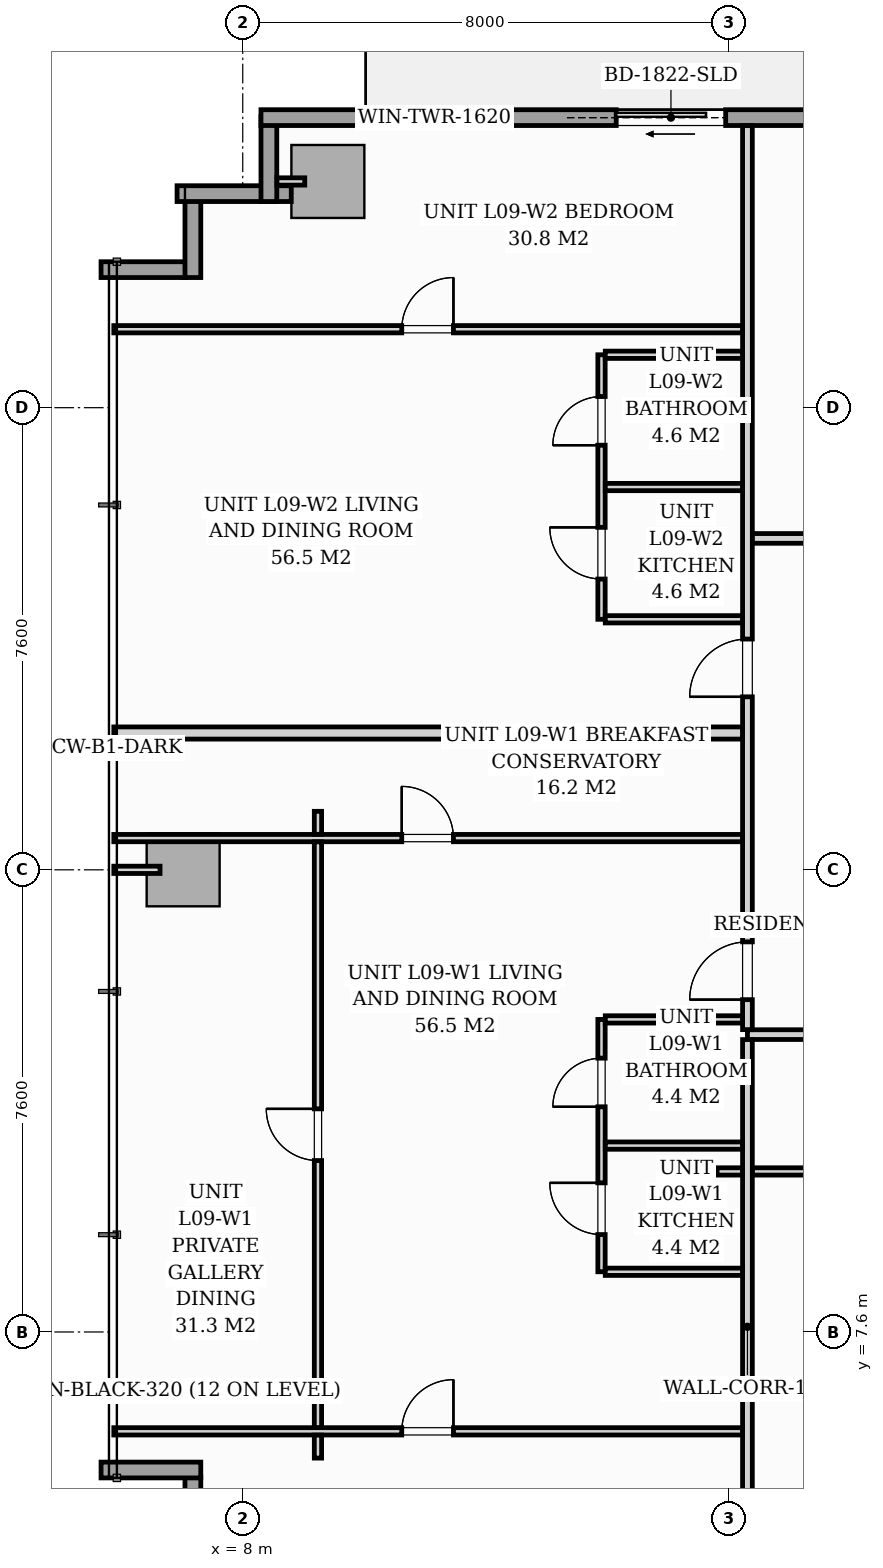
"""IFC4 building model, lengths in metres.
Left out: names, types, materials, properties, quantities, classifications, styles, units other than length and angle.
Written with IfcOpenShell. Run it as: python <this file> out.ifc"""

import sys

from ifc_helpers import new_model, si_unit, direction, frame, frame_2d, origin, origin_2d, place, context, subcontext, project, spatial, rectangle, extrude, source, transform, mapped, element, fill, save


model = new_model("IFC4")
c1 = context("Model", 3, precision=1e-05, world=origin(), true_north=direction((0.0, 1.0)))
c2 = subcontext(c1, "Body", "Model", "MODEL_VIEW")
j1 = project(units=[si_unit("LENGTHUNIT", "METRE"), si_unit("PLANEANGLEUNIT", "RADIAN")], contexts=[c1])
p1 = place(None, origin())
s1 = spatial("IfcSite", under=j1, at=p1, CompositionType="ELEMENT")
p2 = place(p1, origin())
s2 = spatial("IfcBuilding", under=s1, at=p2, CompositionType="ELEMENT")
p3 = place(p2, frame((0.0, 0.0, 35.8)))
s3 = spatial("IfcBuildingStorey", under=s2, at=p3, CompositionType="ELEMENT", Elevation=35.8)
m1 = source(origin(), c2, "Body", "SweptSolid", [
    extrude(rectangle(XDim=1.2, YDim=1.2, at=origin_2d()), origin(), (0.0, 0.0, 1.0), 3.196),
])
for number, where, z_axis, x_axis in (
    (1, (9.4, 26.52, 0.002), (0.0, 0.0, 1.0), (1.0, 0.0, 0.0)),
    (2, (7.02, 15.2, 0.002), (0.0, 0.0, 1.0), (1.0, 0.0, 0.0)),
):
    element("IfcColumn", number, at=place(p3, frame(where, z_axis=z_axis, x_axis=x_axis)), inside=s3, PredefinedType="COLUMN", context=c2, shape_type="MappedRepresentation", body=[
        mapped(m1, transform((0.0, 0.0, 0.0), scale=1.0)),
    ])
p4 = place(p3, frame((7.18, 4.065, 0.0), z_axis=(0.0, 0.0, 1.0), x_axis=(0.0, 1.0, 0.0)))
e3 = element("IfcWall", 3, at=p4, inside=s3, PredefinedType="STANDARD", context=c2, shape_type="SweptSolid", body=[
    extrude(rectangle(XDim=1.15, YDim=0.26, at=frame_2d((0.575, 0.0))), origin(), (0.0, 0.0, 1.0), 2.94),
])
p5 = place(p3, frame((7.31, 5.33, 0.0), z_axis=(0.0, 0.0, 1.0), x_axis=(-1.0, 0.0, 0.0)))
e4 = element("IfcWall", 4, at=p5, inside=s3, PredefinedType="STANDARD", context=c2, shape_type="SweptSolid", body=[
    extrude(rectangle(XDim=1.64, YDim=0.26, at=frame_2d((0.82, 0.0))), origin(), (0.0, 0.0, 1.0), 2.94),
])
for number, where, z_axis, x_axis in (
    (5, (5.67, 25.07, 0.0), (0.0, 0.0, 1.0), (1.0, 0.0, 0.0)),
    (6, (7.18, 24.94, 0.0), (0.0, 0.0, 1.0), (0.0, 1.0, 0.0)),
):
    element("IfcWall", number, at=place(p3, frame(where, z_axis=z_axis, x_axis=x_axis)), inside=s3, PredefinedType="STANDARD", context=c2, shape_type="SweptSolid", body=[
        extrude(rectangle(XDim=1.395, YDim=0.26, at=frame_2d((0.698, 0.0))), origin(), (0.0, 0.0, 1.0), 2.94),
    ])
p6 = place(p3, frame((6.92, 26.32, 0.0), z_axis=(0.0, 0.0, 1.0), x_axis=(1.0, 0.0, 0.0)))
e7 = element("IfcWall", 7, at=p6, inside=s3, PredefinedType="STANDARD", context=c2, shape_type="SweptSolid", body=[
    extrude(rectangle(XDim=1.878, YDim=0.26, at=frame_2d((0.939, 0.0))), origin(), (0.0, 0.0, 1.0), 2.94),
])
p7 = place(p3, frame((8.43, 26.19, 0.0), z_axis=(0.0, 0.0, 1.0), x_axis=(0.0, 1.0, 0.0)))
e8 = element("IfcWall", 8, at=p7, inside=s3, PredefinedType="STANDARD", context=c2, shape_type="SweptSolid", body=[
    extrude(rectangle(XDim=1.395, YDim=0.26, at=frame_2d((0.698, 0.0))), origin(), (0.0, 0.0, 1.0), 2.94),
])
p8 = place(p3, frame((8.3, 27.57, 0.0), z_axis=(0.0, 0.0, 1.0), x_axis=(1.0, 0.0, 0.0)))
e9 = element("IfcWall", 9, at=p8, inside=s3, PredefinedType="STANDARD", context=c2, shape_type="SweptSolid", body=[
    extrude(rectangle(XDim=17.15, YDim=0.26, at=frame_2d((8.575, 0.0))), origin(), (0.0, 0.0, 1.0), 2.94),
])
p9 = place(p8, frame((5.842, 0.0, 0.0)))
e10 = element("IfcOpeningElement", 10, at=p9, cuts=e9, PredefinedType="OPENING", context=c2, shape_type="SweptSolid", body=[
    extrude(rectangle(XDim=1.8, YDim=2.06, at=frame_2d((0.9, 1.03))), frame((0.0, 0.14, 0.0), z_axis=(0.0, -1.0, 0.0), x_axis=(1.0, 0.0, 0.0)), (0.0, 0.0, 1.0), 0.28),
])
p10 = place(p8, frame((2.05, 0.0, 0.65)))
e11 = element("IfcOpeningElement", 11, at=p10, cuts=e9, PredefinedType="OPENING", context=c2, shape_type="SweptSolid", body=[
    extrude(rectangle(XDim=1.6, YDim=1.5, at=frame_2d((0.8, 0.75))), frame((0.0, 0.14, 0.0), z_axis=(0.0, -1.0, 0.0), x_axis=(1.0, 0.0, 0.0)), (0.0, 0.0, 1.0), 0.28),
])
p11 = place(p3, frame((16.3, 12.49, 0.0), z_axis=(0.0, 0.0, 1.0), x_axis=(1.0, 0.0, 0.0)))
e12 = element("IfcWall", 12, at=p11, inside=s3, PredefinedType="PARTITIONING", context=c2, shape_type="SweptSolid", body=[
    extrude(rectangle(XDim=35.2, YDim=0.16, at=frame_2d((17.6, 0.0))), origin(), (0.0, 0.0, 1.0), 2.94),
])
p12 = place(p11, frame((11.072, 0.0, 0.0)))
e13 = element("IfcOpeningElement", 13, at=p12, cuts=e12, PredefinedType="OPENING", context=c2, shape_type="SweptSolid", body=[
    extrude(rectangle(XDim=0.95, YDim=2.06, at=frame_2d((0.475, 1.03))), frame((0.0, 0.09, 0.0), z_axis=(0.0, -1.0, 0.0), x_axis=(1.0, 0.0, 0.0)), (0.0, 0.0, 1.0), 0.18),
])
p13 = place(p11, frame((24.032, 0.0, 0.0)))
e14 = element("IfcOpeningElement", 14, at=p13, cuts=e12, PredefinedType="OPENING", context=c2, shape_type="SweptSolid", body=[
    extrude(rectangle(XDim=0.95, YDim=2.06, at=frame_2d((0.475, 1.03))), frame((0.0, 0.09, 0.0), z_axis=(0.0, -1.0, 0.0), x_axis=(1.0, 0.0, 0.0)), (0.0, 0.0, 1.0), 0.18),
])
p14 = place(p3, frame((16.3, 2.962, 0.0), z_axis=(0.0, 0.0, 1.0), x_axis=(0.0, 1.0, 0.0)))
e15 = element("IfcWall", 15, at=p14, inside=s3, PredefinedType="PARTITIONING", context=c2, shape_type="SweptSolid", body=[
    extrude(rectangle(XDim=9.446, YDim=0.16, at=frame_2d((4.723, 0.0))), origin(), (0.0, 0.0, 1.0), 2.94),
])
p15 = place(p3, frame((16.3, 12.572, 0.0), z_axis=(0.0, 0.0, 1.0), x_axis=(0.0, 1.0, 0.0)))
e16 = element("IfcWall", 16, at=p15, inside=s3, PredefinedType="PARTITIONING", context=c2, shape_type="SweptSolid", body=[
    extrude(rectangle(XDim=14.866, YDim=0.16, at=frame_2d((7.433, 0.0))), origin(), (0.0, 0.0, 1.0), 2.94),
])
p16 = place(p15, frame((0.493, 0.0, 0.0)))
e17 = element("IfcOpeningElement", 17, at=p16, cuts=e16, PredefinedType="OPENING", context=c2, shape_type="SweptSolid", body=[
    extrude(rectangle(XDim=0.95, YDim=2.06, at=frame_2d((0.475, 1.03))), frame((0.0, 0.09, 0.0), z_axis=(0.0, -1.0, 0.0), x_axis=(1.0, 0.0, 0.0)), (0.0, 0.0, 1.0), 0.18),
])
p17 = place(p15, frame((5.473, 0.0, 0.0)))
e18 = element("IfcOpeningElement", 18, at=p17, cuts=e16, PredefinedType="OPENING", context=c2, shape_type="SweptSolid", body=[
    extrude(rectangle(XDim=0.95, YDim=2.06, at=frame_2d((0.475, 1.03))), frame((0.0, 0.09, 0.0), z_axis=(0.0, -1.0, 0.0), x_axis=(1.0, 0.0, 0.0)), (0.0, 0.0, 1.0), 0.18),
])
p18 = place(p3, frame((15.8, 10.24, 0.0), z_axis=(0.0, 0.0, 1.0), x_axis=(1.0, 0.0, 0.0)))
e19 = element("IfcWall", 19, at=p18, inside=s3, PredefinedType="PARTITIONING", context=c2, shape_type="SweptSolid", body=[
    extrude(rectangle(XDim=0.418, YDim=0.12, at=frame_2d((0.209, 0.0))), origin(), (0.0, 0.0, 1.0), 2.94),
])
p19 = place(p3, frame((16.382, 10.24, 0.0), z_axis=(0.0, 0.0, 1.0), x_axis=(1.0, 0.0, 0.0)))
e20 = element("IfcWall", 20, at=p19, inside=s3, PredefinedType="PARTITIONING", context=c2, shape_type="SweptSolid", body=[
    extrude(rectangle(XDim=3.386, YDim=0.12, at=frame_2d((1.693, 0.0))), origin(), (0.0, 0.0, 1.0), 2.94),
])
p20 = place(p3, frame((5.88, 17.45, 0.0), z_axis=(0.0, 0.0, 1.0), x_axis=(1.0, 0.0, 0.0)))
e21 = element("IfcWall", 21, at=p20, inside=s3, PredefinedType="PARTITIONING", context=c2, shape_type="SweptSolid", body=[
    extrude(rectangle(XDim=10.338, YDim=0.2, at=frame_2d((5.169, 0.0))), origin(), (0.0, 0.0, 1.0), 2.94),
])
p21 = place(p3, frame((13.9, 8.59, 0.0), z_axis=(0.0, 0.0, 1.0), x_axis=(0.0, 1.0, 0.0)))
e22 = element("IfcWall", 22, at=p21, inside=s3, PredefinedType="PARTITIONING", context=c2, shape_type="SweptSolid", body=[
    extrude(rectangle(XDim=4.15, YDim=0.12, at=frame_2d((2.075, 0.0))), origin(), (0.0, 0.0, 1.0), 2.94),
])
p22 = place(p21, frame((0.612, 0.0, 0.0)))
e23 = element("IfcOpeningElement", 23, at=p22, cuts=e22, PredefinedType="OPENING", context=c2, shape_type="SweptSolid", body=[
    extrude(rectangle(XDim=0.85, YDim=2.05, at=frame_2d((0.425, 1.025))), frame((0.0, 0.07, 0.0), z_axis=(0.0, -1.0, 0.0), x_axis=(1.0, 0.0, 0.0)), (0.0, 0.0, 1.0), 0.14),
])
p23 = place(p21, frame((2.713, 0.0, 0.0)))
e24 = element("IfcOpeningElement", 24, at=p23, cuts=e22, PredefinedType="OPENING", context=c2, shape_type="SweptSolid", body=[
    extrude(rectangle(XDim=0.8, YDim=2.02, at=frame_2d((0.4, 1.01))), frame((0.0, 0.07, 0.0), z_axis=(0.0, -1.0, 0.0), x_axis=(1.0, 0.0, 0.0)), (0.0, 0.0, 1.0), 0.14),
])
for number, where, z_axis, x_axis in (
    (25, (13.962, 10.665, 0.0), (0.0, 0.0, 1.0), (1.0, 0.0, 0.0)),
    (26, (13.962, 8.59, 0.0), (0.0, 0.0, 1.0), (1.0, 0.0, 0.0)),
    (27, (13.962, 12.74, 0.0), (0.0, 0.0, 1.0), (1.0, 0.0, 0.0)),
):
    element("IfcWall", number, at=place(p3, frame(where, z_axis=z_axis, x_axis=x_axis)), inside=s3, PredefinedType="PARTITIONING", context=c2, shape_type="SweptSolid", body=[
        extrude(rectangle(XDim=2.256, YDim=0.12, at=frame_2d((1.128, 0.0))), origin(), (0.0, 0.0, 1.0), 2.94),
    ])
p24 = place(p3, frame((5.88, 5.966, 0.0), z_axis=(0.0, 0.0, 1.0), x_axis=(1.0, 0.0, 0.0)))
e28 = element("IfcWall", 28, at=p24, inside=s3, PredefinedType="PARTITIONING", context=c2, shape_type="SweptSolid", body=[
    extrude(rectangle(XDim=10.338, YDim=0.12, at=frame_2d((5.169, 0.0))), origin(), (0.0, 0.0, 1.0), 2.94),
])
p25 = place(p24, frame((4.735, 0.0, 0.0)))
e29 = element("IfcOpeningElement", 29, at=p25, cuts=e28, PredefinedType="OPENING", context=c2, shape_type="SweptSolid", body=[
    extrude(rectangle(XDim=0.85, YDim=2.05, at=frame_2d((0.425, 1.025))), frame((0.0, 0.07, 0.0), z_axis=(0.0, -1.0, 0.0), x_axis=(1.0, 0.0, 0.0)), (0.0, 0.0, 1.0), 0.14),
])
p26 = place(p3, frame((5.88, 15.722, 0.0), z_axis=(0.0, 0.0, 1.0), x_axis=(1.0, 0.0, 0.0)))
e30 = element("IfcWall", 30, at=p26, inside=s3, PredefinedType="PARTITIONING", context=c2, shape_type="SweptSolid", body=[
    extrude(rectangle(XDim=10.338, YDim=0.12, at=frame_2d((5.169, 0.0))), origin(), (0.0, 0.0, 1.0), 2.045),
])
p27 = place(p26, frame((4.735, 0.0, 0.0)))
e31 = element("IfcOpeningElement", 31, at=p27, cuts=e30, PredefinedType="OPENING", context=c2, shape_type="SweptSolid", body=[
    extrude(rectangle(XDim=0.85, YDim=2.01, at=frame_2d((0.425, 1.005))), frame((0.0, 0.07, 0.0), z_axis=(0.0, -1.0, 0.0), x_axis=(1.0, 0.0, 0.0)), (0.0, 0.0, 1.0), 0.14),
])
p28 = place(p3, frame((9.237, 5.526, 0.0), z_axis=(0.0, 0.0, 1.0), x_axis=(0.0, 1.0, 0.0)))
e32 = element("IfcWall", 32, at=p28, inside=s3, PredefinedType="PARTITIONING", context=c2, shape_type="SweptSolid", body=[
    extrude(rectangle(XDim=0.378, YDim=0.12, at=frame_2d((0.189, 0.0))), origin(), (0.0, 0.0, 1.0), 2.94),
])
p29 = place(p3, frame((9.237, 6.028, 0.0), z_axis=(0.0, 0.0, 1.0), x_axis=(0.0, 1.0, 0.0)))
e33 = element("IfcWall", 33, at=p29, inside=s3, PredefinedType="PARTITIONING", context=c2, shape_type="SweptSolid", body=[
    extrude(rectangle(XDim=9.632, YDim=0.12, at=frame_2d((4.816, 0.0))), origin(), (0.0, 0.0, 1.0), 2.94),
])
p30 = place(p29, frame((4.391, 0.0, 0.0)))
e34 = element("IfcOpeningElement", 34, at=p30, cuts=e33, PredefinedType="OPENING", context=c2, shape_type="SweptSolid", body=[
    extrude(rectangle(XDim=0.85, YDim=2.05, at=frame_2d((0.425, 1.025))), frame((0.0, 0.07, 0.0), z_axis=(0.0, -1.0, 0.0), x_axis=(1.0, 0.0, 0.0)), (0.0, 0.0, 1.0), 0.14),
])
p31 = place(p3, frame((9.237, 15.784, 0.0), z_axis=(0.0, 0.0, 1.0), x_axis=(0.0, 1.0, 0.0)))
e35 = element("IfcWall", 35, at=p31, inside=s3, PredefinedType="PARTITIONING", context=c2, shape_type="SweptSolid", body=[
    extrude(rectangle(XDim=0.378, YDim=0.12, at=frame_2d((0.189, 0.0))), origin(), (0.0, 0.0, 1.0), 2.94),
])
p32 = place(p3, frame((13.9, 19.32, 0.0), z_axis=(0.0, 0.0, 1.0), x_axis=(0.0, 1.0, 0.0)))
e36 = element("IfcWall", 36, at=p32, inside=s3, PredefinedType="PARTITIONING", context=c2, shape_type="SweptSolid", body=[
    extrude(rectangle(XDim=4.35, YDim=0.12, at=frame_2d((2.175, 0.0))), origin(), (0.0, 0.0, 1.0), 2.94),
])
p33 = place(p32, frame((0.662, 0.0, 0.0)))
e37 = element("IfcOpeningElement", 37, at=p33, cuts=e36, PredefinedType="OPENING", context=c2, shape_type="SweptSolid", body=[
    extrude(rectangle(XDim=0.85, YDim=2.05, at=frame_2d((0.425, 1.025))), frame((0.0, 0.07, 0.0), z_axis=(0.0, -1.0, 0.0), x_axis=(1.0, 0.0, 0.0)), (0.0, 0.0, 1.0), 0.14),
])
p34 = place(p32, frame((2.863, 0.0, 0.0)))
e38 = element("IfcOpeningElement", 38, at=p34, cuts=e36, PredefinedType="OPENING", context=c2, shape_type="SweptSolid", body=[
    extrude(rectangle(XDim=0.8, YDim=2.02, at=frame_2d((0.4, 1.01))), frame((0.0, 0.07, 0.0), z_axis=(0.0, -1.0, 0.0), x_axis=(1.0, 0.0, 0.0)), (0.0, 0.0, 1.0), 0.14),
])
for number, where, z_axis, x_axis in (
    (39, (13.962, 21.495, 0.0), (0.0, 0.0, 1.0), (1.0, 0.0, 0.0)),
    (40, (13.962, 19.32, 0.0), (0.0, 0.0, 1.0), (1.0, 0.0, 0.0)),
    (41, (13.962, 23.67, 0.0), (0.0, 0.0, 1.0), (1.0, 0.0, 0.0)),
):
    element("IfcWall", number, at=place(p3, frame(where, z_axis=z_axis, x_axis=x_axis)), inside=s3, PredefinedType="PARTITIONING", context=c2, shape_type="SweptSolid", body=[
        extrude(rectangle(XDim=2.256, YDim=0.12, at=frame_2d((1.128, 0.0))), origin(), (0.0, 0.0, 1.0), 2.94),
    ])
p35 = place(p3, frame((5.88, 24.09, 0.0), z_axis=(0.0, 0.0, 1.0), x_axis=(1.0, 0.0, 0.0)))
e42 = element("IfcWall", 42, at=p35, inside=s3, PredefinedType="PARTITIONING", context=c2, shape_type="SweptSolid", body=[
    extrude(rectangle(XDim=10.338, YDim=0.12, at=frame_2d((5.169, 0.0))), origin(), (0.0, 0.0, 1.0), 2.94),
])
p36 = place(p35, frame((4.735, 0.0, 0.0)))
e43 = element("IfcOpeningElement", 43, at=p36, cuts=e42, PredefinedType="OPENING", context=c2, shape_type="SweptSolid", body=[
    extrude(rectangle(XDim=0.85, YDim=2.05, at=frame_2d((0.425, 1.025))), frame((0.0, 0.07, 0.0), z_axis=(0.0, -1.0, 0.0), x_axis=(1.0, 0.0, 0.0)), (0.0, 0.0, 1.0), 0.14),
])
p37 = place(p3, frame((16.382, 20.65, 0.0), z_axis=(0.0, 0.0, 1.0), x_axis=(1.0, 0.0, 0.0)))
e44 = element("IfcWall", 44, at=p37, inside=s3, PredefinedType="PARTITIONING", context=c2, shape_type="SweptSolid", body=[
    extrude(rectangle(XDim=1.786, YDim=0.16, at=frame_2d((0.893, 0.0))), origin(), (0.0, 0.0, 1.0), 2.94),
])
p38 = place(p3, frame((9.02, 26.52, 0.0), z_axis=(0.0, 0.0, 1.0), x_axis=(-1.0, 0.0, 0.0)))
e45 = element("IfcWall", 45, at=p38, inside=s3, PredefinedType="PARTITIONING", context=c2, shape_type="SweptSolid", body=[
    extrude(rectangle(XDim=0.458, YDim=0.12, at=frame_2d((0.229, 0.0))), origin(), (0.0, 0.0, 1.0), 2.94),
])
p39 = place(p3, frame((6.64, 15.2, 0.0), z_axis=(0.0, 0.0, 1.0), x_axis=(-1.0, 0.0, 0.0)))
e46 = element("IfcWall", 46, at=p39, inside=s3, PredefinedType="PARTITIONING", context=c2, shape_type="SweptSolid", body=[
    extrude(rectangle(XDim=0.76, YDim=0.12, at=frame_2d((0.38, 0.0))), origin(), (0.0, 0.0, 1.0), 2.94),
])
m2 = source(origin(), c2, "Body", "SweptSolid", [
    extrude(rectangle(XDim=1.8, YDim=2.06, at=frame_2d((0.9, 1.03))), frame((0.0, 0.025, 0.0), z_axis=(0.0, -1.0, 0.0), x_axis=(1.0, 0.0, 0.0)), (0.0, 0.0, 1.0), 0.05),
])
p40 = place(p9, origin())
e47 = element("IfcDoor", 47, at=p40, inside=s3, OperationType="SLIDING_TO_LEFT", PredefinedType="DOOR", context=c2, shape_type="MappedRepresentation", body=[
    mapped(m2, transform((0.0, 0.0, 0.0), scale=1.0)),
])
fill(e10, e47)
m3 = source(origin(), c2, "Body", "SweptSolid", [
    extrude(rectangle(XDim=1.6, YDim=1.5, at=frame_2d((0.8, 0.75))), frame((0.0, 0.03, 0.0), z_axis=(0.0, -1.0, 0.0), x_axis=(1.0, 0.0, 0.0)), (0.0, 0.0, 1.0), 0.06),
])
p41 = place(p10, origin())
e48 = element("IfcWindow", 48, at=p41, inside=s3, PartitioningType="SINGLE_PANEL", PredefinedType="WINDOW", context=c2, shape_type="MappedRepresentation", body=[
    mapped(m3, transform((0.0, 0.0, 0.0), scale=1.0)),
])
fill(e11, e48)
m4 = source(origin(), c2, "Body", "SweptSolid", [
    extrude(rectangle(XDim=0.95, YDim=2.06, at=frame_2d((0.475, 1.03))), frame((0.0, 0.025, 0.0), z_axis=(0.0, -1.0, 0.0), x_axis=(1.0, 0.0, 0.0)), (0.0, 0.0, 1.0), 0.05),
])
p42 = place(p16, origin())
e49 = element("IfcDoor", 49, at=p42, inside=s3, OperationType="SINGLE_SWING_LEFT", PredefinedType="DOOR", context=c2, shape_type="MappedRepresentation", body=[
    mapped(m4, transform((0.0, 0.0, 0.0), scale=1.0)),
])
fill(e17, e49)
m5 = source(origin(), c2, "Body", "SweptSolid", [
    extrude(rectangle(XDim=0.85, YDim=2.05, at=frame_2d((0.425, 1.025))), frame((0.0, 0.025, 0.0), z_axis=(0.0, -1.0, 0.0), x_axis=(1.0, 0.0, 0.0)), (0.0, 0.0, 1.0), 0.05),
])
p43 = place(p22, origin())
e50 = element("IfcDoor", 50, at=p43, inside=s3, OperationType="SINGLE_SWING_RIGHT", PredefinedType="DOOR", context=c2, shape_type="MappedRepresentation", body=[
    mapped(m5, transform((0.0, 0.0, 0.0), scale=1.0)),
])
fill(e23, e50)
m6 = source(origin(), c2, "Body", "SweptSolid", [
    extrude(rectangle(XDim=0.8, YDim=2.02, at=frame_2d((0.4, 1.01))), frame((0.0, 0.025, 0.0), z_axis=(0.0, -1.0, 0.0), x_axis=(1.0, 0.0, 0.0)), (0.0, 0.0, 1.0), 0.05),
])
p44 = place(p23, origin())
e51 = element("IfcDoor", 51, at=p44, inside=s3, OperationType="SINGLE_SWING_LEFT", PredefinedType="DOOR", context=c2, shape_type="MappedRepresentation", body=[
    mapped(m6, transform((0.0, 0.0, 0.0), scale=1.0)),
])
fill(e24, e51)
p45 = place(p25, origin())
e52 = element("IfcDoor", 52, at=p45, inside=s3, OperationType="SINGLE_SWING_RIGHT", PredefinedType="DOOR", context=c2, shape_type="MappedRepresentation", body=[
    mapped(m5, transform((0.0, 0.0, 0.0), scale=1.0)),
])
fill(e29, e52)
m7 = source(origin(), c2, "Body", "SweptSolid", [
    extrude(rectangle(XDim=0.85, YDim=2.01, at=frame_2d((0.425, 1.005))), frame((0.0, 0.025, 0.0), z_axis=(0.0, -1.0, 0.0), x_axis=(1.0, 0.0, 0.0)), (0.0, 0.0, 1.0), 0.05),
])
p46 = place(p27, origin())
e53 = element("IfcDoor", 53, at=p46, inside=s3, OperationType="SINGLE_SWING_LEFT", PredefinedType="DOOR", context=c2, shape_type="MappedRepresentation", body=[
    mapped(m7, transform((0.0, 0.0, 0.0), scale=1.0)),
])
fill(e31, e53)
p47 = place(p30, origin())
e54 = element("IfcDoor", 54, at=p47, inside=s3, OperationType="SINGLE_SWING_RIGHT", PredefinedType="DOOR", context=c2, shape_type="MappedRepresentation", body=[
    mapped(m5, transform((0.0, 0.0, 0.0), scale=1.0)),
])
fill(e34, e54)
p48 = place(p17, origin())
e55 = element("IfcDoor", 55, at=p48, inside=s3, OperationType="SINGLE_SWING_LEFT", PredefinedType="DOOR", context=c2, shape_type="MappedRepresentation", body=[
    mapped(m4, transform((0.0, 0.0, 0.0), scale=1.0)),
])
fill(e18, e55)
p49 = place(p33, origin())
e56 = element("IfcDoor", 56, at=p49, inside=s3, OperationType="SINGLE_SWING_RIGHT", PredefinedType="DOOR", context=c2, shape_type="MappedRepresentation", body=[
    mapped(m5, transform((0.0, 0.0, 0.0), scale=1.0)),
])
fill(e37, e56)
p50 = place(p34, origin())
e57 = element("IfcDoor", 57, at=p50, inside=s3, OperationType="SINGLE_SWING_LEFT", PredefinedType="DOOR", context=c2, shape_type="MappedRepresentation", body=[
    mapped(m6, transform((0.0, 0.0, 0.0), scale=1.0)),
])
fill(e38, e57)
p51 = place(p36, origin())
e58 = element("IfcDoor", 58, at=p51, inside=s3, OperationType="SINGLE_SWING_RIGHT", PredefinedType="DOOR", context=c2, shape_type="MappedRepresentation", body=[
    mapped(m5, transform((0.0, 0.0, 0.0), scale=1.0)),
])
fill(e43, e58)
save(model, sys.argv[1])
